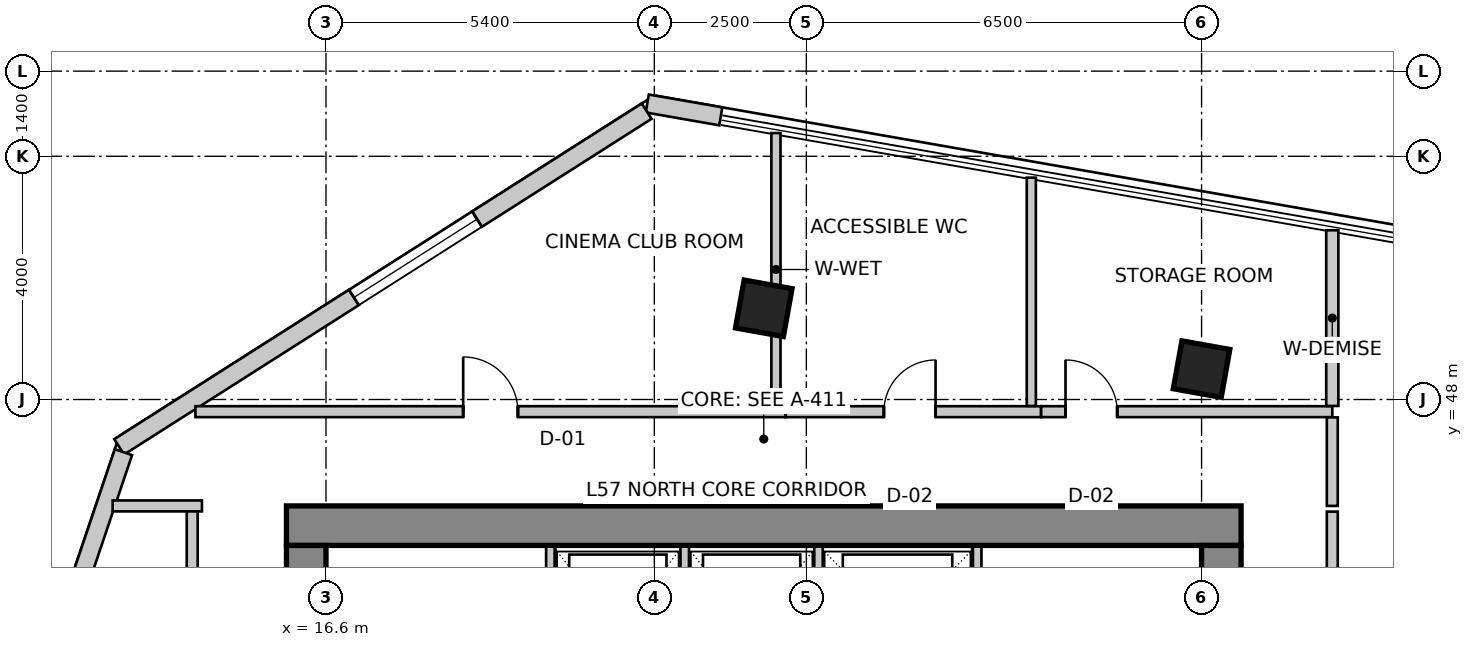
"""IFC4 building model, lengths in metres.
Left out: names, types, materials, properties, quantities, classifications, styles, units other than length and angle.
Written with IfcOpenShell. Run it as: python <this file> out.ifc"""

import sys

from ifc_helpers import new_model, si_unit, direction, frame, frame_2d, origin, origin_2d, place, context, subcontext, project, spatial, rectangle, extrude, source, transform, mapped, element, fill, save


model = new_model("IFC4")
c1 = context("Model", 3, precision=1e-05, world=origin(), true_north=direction((0.0, 1.0)))
c2 = subcontext(c1, "Body", "Model", "MODEL_VIEW")
j1 = project(units=[si_unit("LENGTHUNIT", "METRE"), si_unit("PLANEANGLEUNIT", "RADIAN")], contexts=[c1])
p1 = place(None, origin())
s1 = spatial("IfcSite", under=j1, at=p1, CompositionType="ELEMENT")
p2 = place(p1, origin())
s2 = spatial("IfcBuilding", under=s1, at=p2, CompositionType="ELEMENT")
p3 = place(p2, frame((0.0, 0.0, 225.4)))
s3 = spatial("IfcBuildingStorey", under=s2, at=p3, CompositionType="ELEMENT", Elevation=225.4)
p4 = place(p3, frame((15.95, 45.925, 0.0), z_axis=(0.0, 0.0, 1.0), x_axis=(1.0, 0.0, 0.0)))
e1 = element("IfcWall", 1, at=p4, inside=s3, PredefinedType="SHEAR", context=c2, shape_type="SweptSolid", body=[
    extrude(rectangle(XDim=15.7, YDim=0.65, at=frame_2d((7.85, 0.0))), origin(), (0.0, 0.0, 1.0), 3.5),
])
p5 = place(p3, frame((16.275, 34.2, 0.0), z_axis=(0.0, 0.0, 1.0), x_axis=(0.0, 1.0, 0.0)))
e2 = element("IfcWall", 2, at=p5, inside=s3, PredefinedType="SHEAR", context=c2, shape_type="SweptSolid", body=[
    extrude(rectangle(XDim=11.4, YDim=0.65, at=frame_2d((5.7, 0.0))), origin(), (0.0, 0.0, 1.0), 3.5),
])
m1 = source(origin(), c2, "Body", "SweptSolid", [
    extrude(rectangle(XDim=1.1, YDim=2.15, at=frame_2d((0.55, 1.075))), frame((0.0, 0.335, 0.0), z_axis=(0.0, -1.0, 0.0), x_axis=(1.0, 0.0, 0.0)), (0.0, 0.0, 1.0), 0.67),
])
p6 = place(p5, frame((7.15, 0.0, 0.0)))
e3 = element("IfcOpeningElement", 3, at=p6, cuts=e2, PredefinedType="OPENING", context=c2, shape_type="MappedRepresentation", body=[
    mapped(m1, transform((0.0, 0.0, 0.0), scale=1.0)),
])
p7 = place(p3, frame((31.325, 34.2, 0.0), z_axis=(0.0, 0.0, 1.0), x_axis=(0.0, 1.0, 0.0)))
e4 = element("IfcWall", 4, at=p7, inside=s3, PredefinedType="SHEAR", context=c2, shape_type="SweptSolid", body=[
    extrude(rectangle(XDim=11.4, YDim=0.65, at=frame_2d((5.7, 0.0))), origin(), (0.0, 0.0, 1.0), 3.5),
])
p8 = place(p7, frame((7.35, 0.0, 0.0)))
e5 = element("IfcOpeningElement", 5, at=p8, cuts=e4, PredefinedType="OPENING", context=c2, shape_type="MappedRepresentation", body=[
    mapped(m1, transform((0.0, 0.0, 0.0), scale=1.0)),
])
m2 = source(origin(), c2, "Body", "SweptSolid", [
    extrude(rectangle(XDim=0.8, YDim=0.8, at=origin_2d()), origin(), (0.0, 0.0, 1.0), 3.5),
])
for number, where, z_axis, x_axis in (
    (6, (23.8, 49.5, 0.0), (0.0, 0.0, 1.0), (0.984, -0.177, 0.0)),
    (7, (31.0, 48.5, 0.0), (0.0, 0.0, 1.0), (0.984, -0.177, 0.0)),
):
    element("IfcColumn", number, at=place(p3, frame(where, z_axis=z_axis, x_axis=x_axis)), inside=s3, PredefinedType="COLUMN", context=c2, shape_type="MappedRepresentation", body=[
        mapped(m2, transform((0.0, 0.0, 0.0), scale=1.0)),
    ])
p9 = place(p3, frame((23.093, 52.657, 0.0), z_axis=(0.0, 0.0, 1.0), x_axis=(-0.985090351288, 0.172037785961, 0.0)))
e8 = element("IfcWall", 8, at=p9, inside=s3, PredefinedType="SOLIDWALL", context=c2, shape_type="SweptSolid", body=[
    extrude(rectangle(XDim=1.228, YDim=0.3, at=frame_2d((0.614, 0.0))), origin(), (0.0, 0.0, 1.0), 3.25),
])
p10 = place(p3, frame((21.874, 52.742, 0.0), z_axis=(0.0, 0.0, 1.0), x_axis=(-0.84365659959, -0.536883173482, 0.0)))
e9 = element("IfcWall", 9, at=p10, inside=s3, PredefinedType="SOLIDWALL", context=c2, shape_type="SweptSolid", body=[
    extrude(rectangle(XDim=10.283, YDim=0.3, at=frame_2d((5.142, 0.0))), origin(), (0.0, 0.0, 1.0), 3.25),
])
m3 = source(origin(), c2, "Body", "SweptSolid", [
    extrude(rectangle(XDim=2.4, YDim=2.2, at=frame_2d((1.2, 1.1))), frame((0.0, 0.16, 0.0), z_axis=(0.0, -1.0, 0.0), x_axis=(1.0, 0.0, 0.0)), (0.0, 0.0, 1.0), 0.32),
])
p11 = place(p10, frame((3.307, 0.0, 0.85)))
e10 = element("IfcOpeningElement", 10, at=p11, cuts=e9, PredefinedType="OPENING", context=c2, shape_type="MappedRepresentation", body=[
    mapped(m3, transform((0.0, 0.0, 0.0), scale=1.0)),
])
p12 = place(p3, frame((13.269, 47.134, 0.0), z_axis=(0.0, 0.0, 1.0), x_axis=(-0.319920776449, -0.947444297464, 0.0)))
e11 = element("IfcWall", 11, at=p12, inside=s3, PredefinedType="SOLIDWALL", context=c2, shape_type="SweptSolid", body=[
    extrude(rectangle(XDim=16.133, YDim=0.3, at=frame_2d((8.067, 0.0))), origin(), (0.0, 0.0, 1.0), 3.25),
])
m4 = source(origin(), c2, "Body", "SweptSolid", [
    extrude(rectangle(XDim=2.1, YDim=2.0, at=frame_2d((1.05, 1.0))), frame((0.0, 0.16, 0.0), z_axis=(0.0, -1.0, 0.0), x_axis=(1.0, 0.0, 0.0)), (0.0, 0.0, 1.0), 0.32),
])
p13 = place(p12, frame((2.513, 0.0, 0.85)))
e12 = element("IfcOpeningElement", 12, at=p13, cuts=e11, PredefinedType="OPENING", context=c2, shape_type="MappedRepresentation", body=[
    mapped(m4, transform((0.0, 0.0, 0.0), scale=1.0)),
])
p14 = place(p12, frame((7.26, 0.0, 0.85)))
e13 = element("IfcOpeningElement", 13, at=p14, cuts=e11, PredefinedType="OPENING", context=c2, shape_type="MappedRepresentation", body=[
    mapped(m3, transform((0.0, 0.0, 0.0), scale=1.0)),
])
p15 = place(p12, frame((12.307, 0.0, 0.85)))
e14 = element("IfcOpeningElement", 14, at=p15, cuts=e11, PredefinedType="OPENING", context=c2, shape_type="MappedRepresentation", body=[
    mapped(m4, transform((0.0, 0.0, 0.0), scale=1.0)),
])
for number, where, z_axis, x_axis in (
    (15, (20.29, 43.28, 0.0), (0.0, 0.0, 1.0), (0.0, 1.0, 0.0)),
    (16, (27.31, 43.28, 0.0), (0.0, 0.0, 1.0), (0.0, 1.0, 0.0)),
):
    element("IfcWall", number, at=place(p3, frame(where, z_axis=z_axis, x_axis=x_axis)), inside=s3, PredefinedType="SOLIDWALL", context=c2, shape_type="SweptSolid", body=[
        extrude(rectangle(XDim=2.3, YDim=0.14, at=frame_2d((1.15, 0.0))), origin(), (0.0, 0.0, 1.0), 3.25),
    ])
for number, where, z_axis, x_axis in (
    (17, (22.5, 43.02, 0.0), (0.0, 0.0, 1.0), (0.0, 1.0, 0.0)),
    (18, (24.7, 43.02, 0.0), (0.0, 0.0, 1.0), (0.0, 1.0, 0.0)),
):
    element("IfcWall", number, at=place(p3, frame(where, z_axis=z_axis, x_axis=x_axis)), inside=s3, PredefinedType="SOLIDWALL", context=c2, shape_type="SweptSolid", body=[
        extrude(rectangle(XDim=2.56, YDim=0.14, at=frame_2d((1.28, 0.0))), origin(), (0.0, 0.0, 1.0), 3.25),
    ])
p16 = place(p3, frame((14.4, 33.644, 0.0), z_axis=(0.0, 0.0, 1.0), x_axis=(0.0, 1.0, 0.0)))
e19 = element("IfcWall", 19, at=p16, inside=s3, PredefinedType="PARTITIONING", context=c2, shape_type="SweptSolid", body=[
    extrude(rectangle(XDim=12.606, YDim=0.18, at=frame_2d((6.303, 0.0))), origin(), (0.0, 0.0, 1.0), 3.25),
])
m5 = source(origin(), c2, "Body", "SweptSolid", [
    extrude(rectangle(XDim=0.9, YDim=2.15, at=frame_2d((0.45, 1.075))), frame((0.0, 0.1, 0.0), z_axis=(0.0, -1.0, 0.0), x_axis=(1.0, 0.0, 0.0)), (0.0, 0.0, 1.0), 0.2),
])
p17 = place(p16, frame((4.399, 0.0, 0.0)))
e20 = element("IfcOpeningElement", 20, at=p17, cuts=e19, PredefinedType="OPENING", context=c2, shape_type="MappedRepresentation", body=[
    mapped(m5, transform((0.0, 0.0, 0.0), scale=1.0)),
])
p18 = place(p3, frame((14.56, 46.25, 0.0), z_axis=(0.0, 0.0, 1.0), x_axis=(-1.0, 0.0, 0.0)))
e21 = element("IfcWall", 21, at=p18, inside=s3, PredefinedType="PARTITIONING", context=c2, shape_type="SweptSolid", body=[
    extrude(rectangle(XDim=1.469, YDim=0.18, at=frame_2d((0.734, 0.0))), origin(), (0.0, 0.0, 1.0), 3.25),
])
p19 = place(p3, frame((14.453, 47.8, 0.0), z_axis=(0.0, 0.0, 1.0), x_axis=(1.0, 0.0, 0.0)))
e22 = element("IfcWall", 22, at=p19, inside=s3, PredefinedType="PARTITIONING", context=c2, shape_type="SweptSolid", body=[
    extrude(rectangle(XDim=9.707, YDim=0.18, at=frame_2d((4.854, 0.0))), origin(), (0.0, 0.0, 1.0), 2.835),
])
p20 = place(p19, frame((4.404, 0.0, 0.0)))
e23 = element("IfcOpeningElement", 23, at=p20, cuts=e22, PredefinedType="OPENING", context=c2, shape_type="MappedRepresentation", body=[
    mapped(m5, transform((0.0, 0.0, 0.0), scale=1.0)),
])
p21 = place(p3, frame((24.162, 47.8, 0.0), z_axis=(0.0, 0.0, 1.0), x_axis=(1.0, 0.0, 0.0)))
e24 = element("IfcWall", 24, at=p21, inside=s3, PredefinedType="PARTITIONING", context=c2, shape_type="SweptSolid", body=[
    extrude(rectangle(XDim=4.198, YDim=0.18, at=frame_2d((2.099, 0.0))), origin(), (0.0, 0.0, 1.0), 3.25),
])
m6 = source(origin(), c2, "Body", "SweptSolid", [
    extrude(rectangle(XDim=0.85, YDim=2.15, at=frame_2d((0.425, 1.075))), frame((0.0, 0.1, 0.0), z_axis=(0.0, -1.0, 0.0), x_axis=(1.0, 0.0, 0.0)), (0.0, 0.0, 1.0), 0.2),
])
p22 = place(p21, frame((1.613, 0.0, 0.0)))
e25 = element("IfcOpeningElement", 25, at=p22, cuts=e24, PredefinedType="OPENING", context=c2, shape_type="MappedRepresentation", body=[
    mapped(m6, transform((0.0, 0.0, 0.0), scale=1.0)),
])
p23 = place(p3, frame((28.362, 47.8, 0.0), z_axis=(0.0, 0.0, 1.0), x_axis=(1.0, 0.0, 0.0)))
e26 = element("IfcWall", 26, at=p23, inside=s3, PredefinedType="PARTITIONING", context=c2, shape_type="SweptSolid", body=[
    extrude(rectangle(XDim=4.788, YDim=0.18, at=frame_2d((2.394, 0.0))), origin(), (0.0, 0.0, 1.0), 2.688),
])
p24 = place(p23, frame((0.401, 0.0, 0.0)))
e27 = element("IfcOpeningElement", 27, at=p24, cuts=e26, PredefinedType="OPENING", context=c2, shape_type="MappedRepresentation", body=[
    mapped(m6, transform((0.0, 0.0, 0.0), scale=1.0)),
])
p25 = place(p3, frame((33.15, 47.706, 0.0), z_axis=(0.0, 0.0, 1.0), x_axis=(0.0, -1.0, 0.0)))
e28 = element("IfcWall", 28, at=p25, inside=s3, PredefinedType="PARTITIONING", context=c2, shape_type="SweptSolid", body=[
    extrude(rectangle(XDim=1.456, YDim=0.18, at=frame_2d((0.728, 0.0))), origin(), (0.0, 0.0, 1.0), 2.835),
])
p26 = place(p3, frame((33.15, 46.156, 0.0), z_axis=(0.0, 0.0, 1.0), x_axis=(0.0, -1.0, 0.0)))
e29 = element("IfcWall", 29, at=p26, inside=s3, PredefinedType="PARTITIONING", context=c2, shape_type="SweptSolid", body=[
    extrude(rectangle(XDim=4.733, YDim=0.18, at=frame_2d((2.366, 0.0))), origin(), (0.0, 0.0, 1.0), 2.688),
])
p27 = place(p26, frame((1.856, 0.0, 0.0)))
e30 = element("IfcOpeningElement", 30, at=p27, cuts=e29, PredefinedType="OPENING", context=c2, shape_type="MappedRepresentation", body=[
    mapped(m5, transform((0.0, 0.0, 0.0), scale=1.0)),
])
p28 = place(p3, frame((24.0, 52.382, 0.0), z_axis=(0.0, 0.0, 1.0), x_axis=(0.0, -1.0, 0.0)))
e31 = element("IfcWall", 31, at=p28, inside=s3, PredefinedType="PARTITIONING", context=c2, shape_type="SweptSolid", body=[
    extrude(rectangle(XDim=4.488, YDim=0.15, at=frame_2d((2.244, 0.0))), origin(), (0.0, 0.0, 1.0), 2.542),
])
p29 = place(p3, frame((28.2, 51.648, 0.0), z_axis=(0.0, 0.0, 1.0), x_axis=(0.0, -1.0, 0.0)))
e32 = element("IfcWall", 32, at=p29, inside=s3, PredefinedType="PARTITIONING", context=c2, shape_type="SweptSolid", body=[
    extrude(rectangle(XDim=3.754, YDim=0.15, at=frame_2d((1.877, 0.0))), origin(), (0.0, 0.0, 1.0), 2.542),
])
p30 = place(p3, frame((33.15, 50.783, 0.0), z_axis=(0.0, 0.0, 1.0), x_axis=(0.0, -1.0, 0.0)))
e33 = element("IfcWall", 33, at=p30, inside=s3, PredefinedType="PARTITIONING", context=c2, shape_type="SweptSolid", body=[
    extrude(rectangle(XDim=2.889, YDim=0.2, at=frame_2d((1.445, 0.0))), origin(), (0.0, 0.0, 1.0), 2.542),
])
m7 = source(origin(), c2, "Body", "SweptSolid", [
    extrude(rectangle(XDim=2.4, YDim=2.2, at=frame_2d((1.2, 1.1))), frame((0.0, -0.015, 0.0), z_axis=(0.0, -1.0, 0.0), x_axis=(1.0, 0.0, 0.0)), (0.0, 0.0, 1.0), 0.06),
])
p31 = place(p11, origin())
e34 = element("IfcWindow", 34, at=p31, inside=s3, PartitioningType="SINGLE_PANEL", PredefinedType="WINDOW", context=c2, shape_type="MappedRepresentation", body=[
    mapped(m7, transform((0.0, 0.0, 0.0), scale=1.0)),
])
fill(e10, e34)
m8 = source(origin(), c2, "Body", "SweptSolid", [
    extrude(rectangle(XDim=0.9, YDim=2.15, at=frame_2d((0.45, 1.075))), frame((0.0, 0.025, 0.0), z_axis=(0.0, -1.0, 0.0), x_axis=(1.0, 0.0, 0.0)), (0.0, 0.0, 1.0), 0.05),
])
p32 = place(p20, origin())
e35 = element("IfcDoor", 35, at=p32, inside=s3, OperationType="SINGLE_SWING_LEFT", PredefinedType="DOOR", context=c2, shape_type="MappedRepresentation", body=[
    mapped(m8, transform((0.0, 0.0, 0.0), scale=1.0)),
])
fill(e23, e35)
m9 = source(origin(), c2, "Body", "SweptSolid", [
    extrude(rectangle(XDim=0.85, YDim=2.15, at=frame_2d((0.425, 1.075))), frame((0.0, 0.025, 0.0), z_axis=(0.0, -1.0, 0.0), x_axis=(1.0, 0.0, 0.0)), (0.0, 0.0, 1.0), 0.05),
])
p33 = place(p22, origin())
e36 = element("IfcDoor", 36, at=p33, inside=s3, OperationType="SINGLE_SWING_RIGHT", PredefinedType="DOOR", context=c2, shape_type="MappedRepresentation", body=[
    mapped(m9, transform((0.0, 0.0, 0.0), scale=1.0)),
])
fill(e25, e36)
p34 = place(p24, origin())
e37 = element("IfcDoor", 37, at=p34, inside=s3, OperationType="SINGLE_SWING_LEFT", PredefinedType="DOOR", context=c2, shape_type="MappedRepresentation", body=[
    mapped(m9, transform((0.0, 0.0, 0.0), scale=1.0)),
])
fill(e27, e37)
save(model, sys.argv[1])
